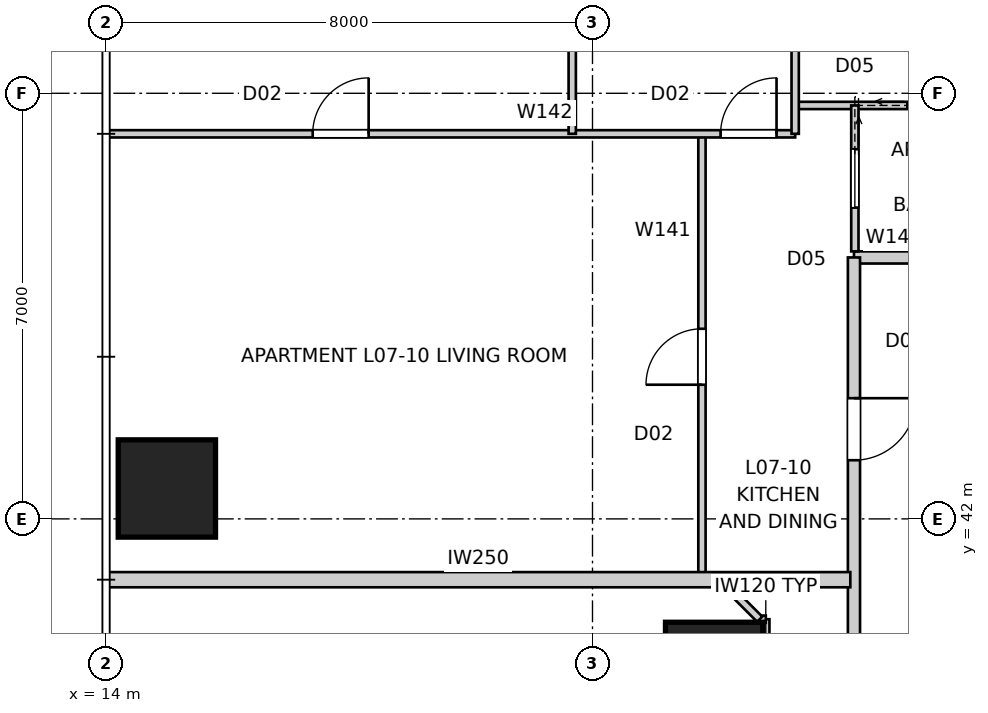
"""IFC4 building model, lengths in metres.
Left out: names, types, materials, properties, quantities, classifications, styles, units other than length and angle.
Written with IfcOpenShell. Run it as: python <this file> out.ifc"""

import sys

from ifc_helpers import new_model, si_unit, direction, frame, frame_2d, origin, origin_2d, place, context, subcontext, project, spatial, rectangle, extrude, element, fill, save


model = new_model("IFC4")
c1 = context("Model", 3, precision=1e-05, world=origin(), true_north=direction((0.0, 1.0)))
c2 = subcontext(c1, "Body", "Model", "MODEL_VIEW")
j1 = project(units=[si_unit("LENGTHUNIT", "METRE"), si_unit("PLANEANGLEUNIT", "RADIAN")], contexts=[c1])
p1 = place(None, origin())
s1 = spatial("IfcSite", under=j1, at=p1, CompositionType="ELEMENT")
p2 = place(p1, origin())
s2 = spatial("IfcBuilding", under=s1, at=p2, CompositionType="ELEMENT")
p3 = place(p2, frame((0.0, 0.0, 28.6)))
s3 = spatial("IfcBuildingStorey", under=s2, at=p3, CompositionType="ELEMENT", Elevation=28.6)
for number, where, z_axis, x_axis in (
    (1, (15.0, 42.5, 0.0), (0.0, 0.0, 1.0), (1.0, 0.0, 0.0)),
    (2, (24.0, 39.5, 0.0), (0.0, 0.0, 1.0), (1.0, 0.0, 0.0)),
):
    element("IfcColumn", number, at=place(p3, frame(where, z_axis=z_axis, x_axis=x_axis)), inside=s3, PredefinedType="COLUMN", context=c2, shape_type="SweptSolid", body=[
        extrude(rectangle(XDim=1.6, YDim=1.6, at=origin_2d()), origin(), (0.0, 0.0, 1.0), 3.4),
    ])
p4 = place(p3, frame((30.758, 46.3, 0.0), z_axis=(0.0, 0.0, 1.0), x_axis=(-1.0, 0.0, 0.0)))
e3 = element("IfcWall", 3, at=p4, inside=s3, PredefinedType="PARTITIONING", context=c2, shape_type="SweptSolid", body=[
    extrude(rectangle(XDim=4.458, YDim=0.2, at=frame_2d((2.229, 0.0))), origin(), (0.0, 0.0, 1.0), 3.25),
])
p5 = place(p3, frame((26.3, 46.3, 0.0), z_axis=(0.0, 0.0, 1.0), x_axis=(0.0, -1.0, 0.0)))
e4 = element("IfcWall", 4, at=p5, inside=s3, PredefinedType="PARTITIONING", context=c2, shape_type="SweptSolid", body=[
    extrude(rectangle(XDim=32.6, YDim=0.2, at=frame_2d((16.3, 0.0))), origin(), (0.0, 0.0, 1.0), 3.25),
])
p6 = place(p5, frame((2.315, 0.0, 0.0)))
e5 = element("IfcOpeningElement", 5, at=p6, cuts=e4, PredefinedType="OPENING", context=c2, shape_type="SweptSolid", body=[
    extrude(rectangle(XDim=1.02, YDim=2.34, at=frame_2d((0.51, 1.17))), frame((0.0, 0.11, 0.0), z_axis=(0.0, -1.0, 0.0), x_axis=(1.0, 0.0, 0.0)), (0.0, 0.0, 1.0), 0.22),
])
p7 = place(p5, frame((10.624, 0.0, 0.0)))
e6 = element("IfcOpeningElement", 6, at=p7, cuts=e4, PredefinedType="OPENING", context=c2, shape_type="SweptSolid", body=[
    extrude(rectangle(XDim=1.02, YDim=2.34, at=frame_2d((0.51, 1.17))), frame((0.0, 0.11, 0.0), z_axis=(0.0, -1.0, 0.0), x_axis=(1.0, 0.0, 0.0)), (0.0, 0.0, 1.0), 0.22),
])
p8 = place(p5, frame((17.848, 0.0, 0.0)))
e7 = element("IfcOpeningElement", 7, at=p8, cuts=e4, PredefinedType="OPENING", context=c2, shape_type="SweptSolid", body=[
    extrude(rectangle(XDim=1.02, YDim=2.34, at=frame_2d((0.51, 1.17))), frame((0.0, 0.11, 0.0), z_axis=(0.0, -1.0, 0.0), x_axis=(1.0, 0.0, 0.0)), (0.0, 0.0, 1.0), 0.22),
])
p9 = place(p5, frame((30.516, 0.0, 0.0)))
e8 = element("IfcOpeningElement", 8, at=p9, cuts=e4, PredefinedType="OPENING", context=c2, shape_type="SweptSolid", body=[
    extrude(rectangle(XDim=1.02, YDim=2.34, at=frame_2d((0.51, 1.17))), frame((0.0, 0.11, 0.0), z_axis=(0.0, -1.0, 0.0), x_axis=(1.0, 0.0, 0.0)), (0.0, 0.0, 1.0), 0.22),
])
p10 = place(p3, frame((14.0, 41.0, 0.0), z_axis=(0.0, 0.0, 1.0), x_axis=(1.0, 0.0, 0.0)))
e9 = element("IfcWall", 9, at=p10, inside=s3, PredefinedType="PARTITIONING", context=c2, shape_type="SweptSolid", body=[
    extrude(rectangle(XDim=12.24, YDim=0.25, at=frame_2d((6.12, 0.0))), origin(), (0.0, 0.0, 1.0), 3.25),
])
p11 = place(p3, frame((25.333, 48.8, 0.0), z_axis=(0.0, 0.0, 1.0), x_axis=(1.0, 0.0, 0.0)))
e10 = element("IfcWall", 10, at=p11, inside=s3, PredefinedType="PARTITIONING", context=c2, shape_type="SweptSolid", body=[
    extrude(rectangle(XDim=29.333, YDim=0.12, at=frame_2d((14.667, 0.0))), origin(), (0.0, 0.0, 1.0), 3.25),
])
p12 = place(p11, frame((19.707, 0.0, 0.0)))
e11 = element("IfcOpeningElement", 11, at=p12, cuts=e10, PredefinedType="OPENING", context=c2, shape_type="SweptSolid", body=[
    extrude(rectangle(XDim=0.92, YDim=2.34, at=frame_2d((0.46, 1.17))), frame((0.0, 0.07, 0.0), z_axis=(0.0, -1.0, 0.0), x_axis=(1.0, 0.0, 0.0)), (0.0, 0.0, 1.0), 0.14),
])
p13 = place(p11, frame((23.348, 0.0, 0.0)))
e12 = element("IfcOpeningElement", 12, at=p13, cuts=e10, PredefinedType="OPENING", context=c2, shape_type="SweptSolid", body=[
    extrude(rectangle(XDim=0.92, YDim=2.34, at=frame_2d((0.46, 1.17))), frame((0.0, 0.07, 0.0), z_axis=(0.0, -1.0, 0.0), x_axis=(1.0, 0.0, 0.0)), (0.0, 0.0, 1.0), 0.14),
])
p14 = place(p11, frame((16.884, 0.0, 0.0)))
e13 = element("IfcOpeningElement", 13, at=p14, cuts=e10, PredefinedType="OPENING", context=c2, shape_type="SweptSolid", body=[
    extrude(rectangle(XDim=0.92, YDim=2.34, at=frame_2d((0.46, 1.17))), frame((0.0, 0.07, 0.0), z_axis=(0.0, -1.0, 0.0), x_axis=(1.0, 0.0, 0.0)), (0.0, 0.0, 1.0), 0.14),
])
p15 = place(p11, frame((26.549, 0.0, 0.0)))
e14 = element("IfcOpeningElement", 14, at=p15, cuts=e10, PredefinedType="OPENING", context=c2, shape_type="SweptSolid", body=[
    extrude(rectangle(XDim=0.96, YDim=2.1, at=frame_2d((0.48, 1.05))), frame((0.0, 0.07, 0.0), z_axis=(0.0, -1.0, 0.0), x_axis=(1.0, 0.0, 0.0)), (0.0, 0.0, 1.0), 0.14),
])
p16 = place(p11, frame((1.844, 0.0, 0.0)))
e15 = element("IfcOpeningElement", 15, at=p16, cuts=e10, PredefinedType="OPENING", context=c2, shape_type="SweptSolid", body=[
    extrude(rectangle(XDim=0.96, YDim=2.1, at=frame_2d((0.48, 1.05))), frame((0.0, 0.07, 0.0), z_axis=(0.0, -1.0, 0.0), x_axis=(1.0, 0.0, 0.0)), (0.0, 0.0, 1.0), 0.14),
])
p17 = place(p11, frame((8.484, 0.0, 0.0)))
e16 = element("IfcOpeningElement", 16, at=p17, cuts=e10, PredefinedType="OPENING", context=c2, shape_type="SweptSolid", body=[
    extrude(rectangle(XDim=0.96, YDim=2.1, at=frame_2d((0.48, 1.05))), frame((0.0, 0.07, 0.0), z_axis=(0.0, -1.0, 0.0), x_axis=(1.0, 0.0, 0.0)), (0.0, 0.0, 1.0), 0.14),
])
p18 = place(p3, frame((26.315, 48.8, 0.0), z_axis=(0.0, 0.0, 1.0), x_axis=(0.0, -1.0, 0.0)))
e17 = element("IfcWall", 17, at=p18, inside=s3, PredefinedType="PARTITIONING", context=c2, shape_type="SweptSolid", body=[
    extrude(rectangle(XDim=2.4, YDim=0.12, at=frame_2d((1.2, 0.0))), origin(), (0.0, 0.0, 1.0), 3.25),
])
p19 = place(p18, frame((0.72, 0.0, 0.0)))
e18 = element("IfcOpeningElement", 18, at=p19, cuts=e17, PredefinedType="OPENING", context=c2, shape_type="SweptSolid", body=[
    extrude(rectangle(XDim=0.96, YDim=2.1, at=frame_2d((0.48, 1.05))), frame((0.0, 0.07, 0.0), z_axis=(0.0, -1.0, 0.0), x_axis=(1.0, 0.0, 0.0)), (0.0, 0.0, 1.0), 0.14),
])
p20 = place(p3, frame((23.8, 41.0, 0.0), z_axis=(0.0, 0.0, 1.0), x_axis=(0.0, 1.0, 0.0)))
e19 = element("IfcWall", 19, at=p20, inside=s3, PredefinedType="PARTITIONING", context=c2, shape_type="SweptSolid", body=[
    extrude(rectangle(XDim=7.333, YDim=0.12, at=frame_2d((3.667, 0.0))), origin(), (0.0, 0.0, 1.0), 3.25),
])
p21 = place(p20, frame((3.207, 0.0, 0.0)))
e20 = element("IfcOpeningElement", 20, at=p21, cuts=e19, PredefinedType="OPENING", context=c2, shape_type="SweptSolid", body=[
    extrude(rectangle(XDim=0.92, YDim=2.34, at=frame_2d((0.46, 1.17))), frame((0.0, 0.07, 0.0), z_axis=(0.0, -1.0, 0.0), x_axis=(1.0, 0.0, 0.0)), (0.0, 0.0, 1.0), 0.14),
])
p22 = place(p3, frame((14.04, 48.333, 0.0), z_axis=(0.0, 0.0, 1.0), x_axis=(1.0, 0.0, 0.0)))
e21 = element("IfcWall", 21, at=p22, inside=s3, PredefinedType="PARTITIONING", context=c2, shape_type="SweptSolid", body=[
    extrude(rectangle(XDim=11.293, YDim=0.12, at=frame_2d((5.646, 0.0))), origin(), (0.0, 0.0, 1.0), 3.25),
])
p23 = place(p22, frame((10.067, 0.0, 0.0)))
e22 = element("IfcOpeningElement", 22, at=p23, cuts=e21, PredefinedType="OPENING", context=c2, shape_type="SweptSolid", body=[
    extrude(rectangle(XDim=0.92, YDim=2.34, at=frame_2d((0.46, 1.17))), frame((0.0, 0.07, 0.0), z_axis=(0.0, -1.0, 0.0), x_axis=(1.0, 0.0, 0.0)), (0.0, 0.0, 1.0), 0.14),
])
p24 = place(p22, frame((3.358, 0.0, 0.0)))
e23 = element("IfcOpeningElement", 23, at=p24, cuts=e21, PredefinedType="OPENING", context=c2, shape_type="SweptSolid", body=[
    extrude(rectangle(XDim=0.92, YDim=2.34, at=frame_2d((0.46, 1.17))), frame((0.0, 0.07, 0.0), z_axis=(0.0, -1.0, 0.0), x_axis=(1.0, 0.0, 0.0)), (0.0, 0.0, 1.0), 0.14),
])
p25 = place(p3, frame((25.333, 48.333, 0.0), z_axis=(0.0, 0.0, 1.0), x_axis=(0.0, 1.0, 0.0)))
e24 = element("IfcWall", 24, at=p25, inside=s3, PredefinedType="PARTITIONING", context=c2, shape_type="SweptSolid", body=[
    extrude(rectangle(XDim=7.627, YDim=0.12, at=frame_2d((3.813, 0.0))), origin(), (0.0, 0.0, 1.0), 2.638),
])
p26 = place(p3, frame((21.667, 55.96, 0.0), z_axis=(0.0, 0.0, 1.0), x_axis=(0.0, -1.0, 0.0)))
e25 = element("IfcWall", 25, at=p26, inside=s3, PredefinedType="PARTITIONING", context=c2, shape_type="SweptSolid", body=[
    extrude(rectangle(XDim=7.627, YDim=0.12, at=frame_2d((3.813, 0.0))), origin(), (0.0, 0.0, 1.0), 3.25),
])
p27 = place(p26, frame((1.525, 0.0, 0.0)))
e26 = element("IfcOpeningElement", 26, at=p27, cuts=e25, PredefinedType="OPENING", context=c2, shape_type="SweptSolid", body=[
    extrude(rectangle(XDim=0.92, YDim=2.34, at=frame_2d((0.46, 1.17))), frame((0.0, 0.07, 0.0), z_axis=(0.0, -1.0, 0.0), x_axis=(1.0, 0.0, 0.0)), (0.0, 0.0, 1.0), 0.14),
])
p28 = place(p3, frame((24.85, 38.65, 0.0), z_axis=(0.0, 0.0, 1.0), x_axis=(0.0, 1.0, 0.0)))
e27 = element("IfcWall", 27, at=p28, inside=s3, PredefinedType="PARTITIONING", context=c2, shape_type="SweptSolid", body=[
    extrude(rectangle(XDim=1.7, YDim=0.12, at=frame_2d((0.85, 0.0))), origin(), (0.0, 0.0, 1.0), 3.25),
])
p29 = place(p3, frame((24.75, 40.35, 0.0), z_axis=(0.0, 0.0, 1.0), x_axis=(-0.707106781187, 0.707106781187, 0.0)))
e28 = element("IfcWall", 28, at=p29, inside=s3, PredefinedType="PARTITIONING", context=c2, shape_type="SweptSolid", body=[
    extrude(rectangle(XDim=0.919, YDim=0.12, at=frame_2d((0.459, 0.0))), origin(), (0.0, 0.0, 1.0), 3.25),
])
p30 = place(p3, frame((24.85, 40.35, 0.0), z_axis=(0.0, 0.0, 1.0), x_axis=(-1.0, 0.0, 0.0)))
e29 = element("IfcWall", 29, at=p30, inside=s3, PredefinedType="PARTITIONING", context=c2, shape_type="SweptSolid", body=[
    extrude(rectangle(XDim=0.1, YDim=0.12, at=frame_2d((0.05, 0.0))), origin(), (0.0, 0.0, 1.0), 3.25),
])
p31 = place(p6, origin())
e30 = element("IfcDoor", 30, at=p31, inside=s3, OperationType="SINGLE_SWING_LEFT", PredefinedType="DOOR", context=c2, shape_type="SweptSolid", body=[
    extrude(rectangle(XDim=1.02, YDim=2.34, at=frame_2d((0.51, 1.17))), frame((0.0, 0.025, 0.0), z_axis=(0.0, -1.0, 0.0), x_axis=(1.0, 0.0, 0.0)), (0.0, 0.0, 1.0), 0.05),
])
fill(e5, e30)
p32 = place(p21, origin())
e31 = element("IfcDoor", 31, at=p32, inside=s3, OperationType="SINGLE_SWING_LEFT", PredefinedType="DOOR", context=c2, shape_type="SweptSolid", body=[
    extrude(rectangle(XDim=0.92, YDim=2.34, at=frame_2d((0.46, 1.17))), frame((0.0, 0.025, 0.0), z_axis=(0.0, -1.0, 0.0), x_axis=(1.0, 0.0, 0.0)), (0.0, 0.0, 1.0), 0.05),
])
fill(e20, e31)
p33 = place(p19, origin())
e32 = element("IfcDoor", 32, at=p33, inside=s3, OperationType="SLIDING_TO_LEFT", PredefinedType="DOOR", context=c2, shape_type="SweptSolid", body=[
    extrude(rectangle(XDim=0.96, YDim=2.1, at=frame_2d((0.48, 1.05))), frame((0.0, 0.025, 0.0), z_axis=(0.0, -1.0, 0.0), x_axis=(1.0, 0.0, 0.0)), (0.0, 0.0, 1.0), 0.05),
])
fill(e18, e32)
p34 = place(p23, origin())
e33 = element("IfcDoor", 33, at=p34, inside=s3, OperationType="SINGLE_SWING_RIGHT", PredefinedType="DOOR", context=c2, shape_type="SweptSolid", body=[
    extrude(rectangle(XDim=0.92, YDim=2.34, at=frame_2d((0.46, 1.17))), frame((0.0, 0.025, 0.0), z_axis=(0.0, -1.0, 0.0), x_axis=(1.0, 0.0, 0.0)), (0.0, 0.0, 1.0), 0.05),
])
fill(e22, e33)
p35 = place(p24, origin())
e34 = element("IfcDoor", 34, at=p35, inside=s3, OperationType="SINGLE_SWING_RIGHT", PredefinedType="DOOR", context=c2, shape_type="SweptSolid", body=[
    extrude(rectangle(XDim=0.92, YDim=2.34, at=frame_2d((0.46, 1.17))), frame((0.0, 0.025, 0.0), z_axis=(0.0, -1.0, 0.0), x_axis=(1.0, 0.0, 0.0)), (0.0, 0.0, 1.0), 0.05),
])
fill(e23, e34)
p36 = place(p16, origin())
e35 = element("IfcDoor", 35, at=p36, inside=s3, OperationType="SLIDING_TO_LEFT", PredefinedType="DOOR", context=c2, shape_type="SweptSolid", body=[
    extrude(rectangle(XDim=0.96, YDim=2.1, at=frame_2d((0.48, 1.05))), frame((0.0, 0.025, 0.0), z_axis=(0.0, -1.0, 0.0), x_axis=(1.0, 0.0, 0.0)), (0.0, 0.0, 1.0), 0.05),
])
fill(e15, e35)
save(model, sys.argv[1])
